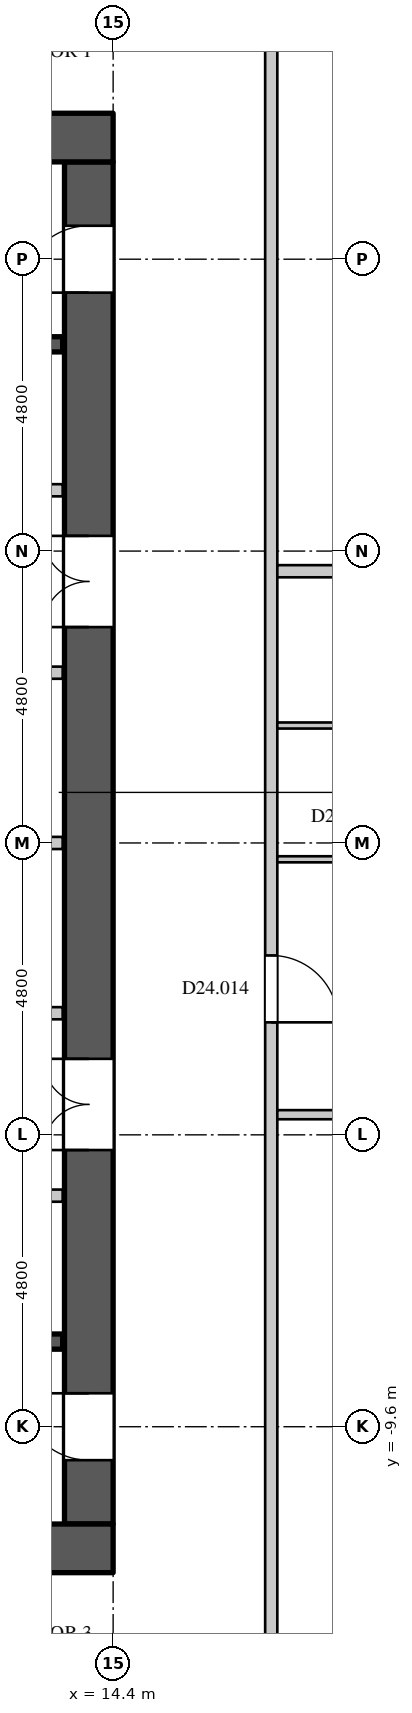
"""IFC4 building model, lengths in metres.
Left out: names, types, materials, properties, quantities, classifications, styles, units other than length and angle.
Written with IfcOpenShell. Run it as: python <this file> out.ifc"""

import sys

from ifc_helpers import new_model, si_unit, direction, frame, frame_2d, origin, place, context, subcontext, project, spatial, rectangle, extrude, element, fill, save


model = new_model("IFC4")
c1 = context("Model", 3, precision=1e-05, world=origin(), true_north=direction((0.0, 1.0)))
c2 = subcontext(c1, "Body", "Model", "MODEL_VIEW")
j1 = project(units=[si_unit("LENGTHUNIT", "METRE"), si_unit("PLANEANGLEUNIT", "RADIAN")], contexts=[c1])
p1 = place(None, origin())
s1 = spatial("IfcSite", under=j1, at=p1, CompositionType="ELEMENT")
p2 = place(p1, origin())
s2 = spatial("IfcBuilding", under=s1, at=p2, CompositionType="ELEMENT")
p3 = place(p2, frame((0.0, 0.0, 106.5)))
s3 = spatial("IfcBuildingStorey", under=s2, at=p3, CompositionType="ELEMENT", Elevation=106.5)
for number, where, z_axis, x_axis in (
    (1, (-14.4, 11.6, 0.0), (0.0, 0.0, 1.0), (1.0, 0.0, 0.0)),
    (2, (-14.4, -11.6, 0.0), (0.0, 0.0, 1.0), (1.0, 0.0, 0.0)),
):
    element("IfcWall", number, at=place(p3, frame(where, z_axis=z_axis, x_axis=x_axis)), inside=s3, PredefinedType="SHEAR", context=c2, shape_type="SweptSolid", body=[
        extrude(rectangle(XDim=28.8, YDim=0.8, at=frame_2d((14.4, 0.0))), origin(), (0.0, 0.0, 1.0), 4.2),
    ])
p4 = place(p3, frame((14.0, -11.2, 0.0), z_axis=(0.0, 0.0, 1.0), x_axis=(0.0, 1.0, 0.0)))
e3 = element("IfcWall", 3, at=p4, inside=s3, PredefinedType="SHEAR", context=c2, shape_type="SweptSolid", body=[
    extrude(rectangle(XDim=22.4, YDim=0.8, at=frame_2d((11.2, 0.0))), origin(), (0.0, 0.0, 1.0), 4.2),
])
p5 = place(p4, frame((20.25, 0.0, 0.0)))
e4 = element("IfcOpeningElement", 4, at=p5, cuts=e3, PredefinedType="OPENING", context=c2, shape_type="SweptSolid", body=[
    extrude(rectangle(XDim=1.1, YDim=2.2, at=frame_2d((0.55, 1.1))), frame((0.0, 0.41, 0.0), z_axis=(0.0, -1.0, 0.0), x_axis=(1.0, 0.0, 0.0)), (0.0, 0.0, 1.0), 0.82),
])
p6 = place(p4, frame((1.05, 0.0, 0.0)))
e5 = element("IfcOpeningElement", 5, at=p6, cuts=e3, PredefinedType="OPENING", context=c2, shape_type="SweptSolid", body=[
    extrude(rectangle(XDim=1.1, YDim=2.2, at=frame_2d((0.55, 1.1))), frame((0.0, 0.41, 0.0), z_axis=(0.0, -1.0, 0.0), x_axis=(1.0, 0.0, 0.0)), (0.0, 0.0, 1.0), 0.82),
])
p7 = place(p4, frame((14.75, 0.0, 0.0)))
e6 = element("IfcOpeningElement", 6, at=p7, cuts=e3, PredefinedType="OPENING", context=c2, shape_type="SweptSolid", body=[
    extrude(rectangle(XDim=1.5, YDim=2.4, at=frame_2d((0.75, 1.2))), frame((0.0, 0.41, 0.0), z_axis=(0.0, -1.0, 0.0), x_axis=(1.0, 0.0, 0.0)), (0.0, 0.0, 1.0), 0.82),
])
p8 = place(p4, frame((6.15, 0.0, 0.0)))
e7 = element("IfcOpeningElement", 7, at=p8, cuts=e3, PredefinedType="OPENING", context=c2, shape_type="SweptSolid", body=[
    extrude(rectangle(XDim=1.5, YDim=2.4, at=frame_2d((0.75, 1.2))), frame((0.0, 0.41, 0.0), z_axis=(0.0, -1.0, 0.0), x_axis=(1.0, 0.0, 0.0)), (0.0, 0.0, 1.0), 0.82),
])
p9 = place(p3, frame((9.02, 5.8, 0.0), z_axis=(0.0, 0.0, 1.0), x_axis=(1.0, 0.0, 0.0)))
e8 = element("IfcWall", 8, at=p9, inside=s3, PredefinedType="PARTITIONING", context=c2, shape_type="SweptSolid", body=[
    extrude(rectangle(XDim=4.55, YDim=0.2, at=frame_2d((2.275, 0.0))), origin(), (0.0, 0.0, 1.0), 3.95),
])
p10 = place(p9, frame((1.8, 0.0, 0.0)))
e9 = element("IfcOpeningElement", 9, at=p10, cuts=e8, PredefinedType="OPENING", context=c2, shape_type="SweptSolid", body=[
    extrude(rectangle(XDim=0.9, YDim=2.2, at=frame_2d((0.45, 1.1))), frame((0.0, 0.11, 0.0), z_axis=(0.0, -1.0, 0.0), x_axis=(1.0, 0.0, 0.0)), (0.0, 0.0, 1.0), 0.22),
])
p11 = place(p3, frame((17.0, -14.5, 0.0), z_axis=(0.0, 0.0, 1.0), x_axis=(0.0, 1.0, 0.0)))
e10 = element("IfcWall", 10, at=p11, inside=s3, PredefinedType="PARTITIONING", context=c2, shape_type="SweptSolid", body=[
    extrude(rectangle(XDim=29.0, YDim=0.2, at=frame_2d((14.5, 0.0))), origin(), (0.0, 0.0, 1.0), 3.95),
])
p12 = place(p11, frame((11.55, 0.0, 0.0)))
e11 = element("IfcOpeningElement", 11, at=p12, cuts=e10, PredefinedType="OPENING", context=c2, shape_type="SweptSolid", body=[
    extrude(rectangle(XDim=1.1, YDim=2.4, at=frame_2d((0.55, 1.2))), frame((0.0, 0.11, 0.0), z_axis=(0.0, -1.0, 0.0), x_axis=(1.0, 0.0, 0.0)), (0.0, 0.0, 1.0), 0.22),
])
p13 = place(p3, frame((15.24, -17.777, 0.0), z_axis=(0.0, 0.0, 1.0), x_axis=(0.707120241298, 0.707093320819, 0.0)))
e12 = element("IfcWall", 12, at=p13, inside=s3, PredefinedType="PARTITIONING", context=c2, shape_type="SweptSolid", body=[
    extrude(rectangle(XDim=9.069, YDim=0.15, at=frame_2d((4.534, 0.0))), origin(), (0.0, 0.0, 1.0), 3.95),
])
p14 = place(p13, frame((5.1, 0.0, 0.0)))
e13 = element("IfcOpeningElement", 13, at=p14, cuts=e12, PredefinedType="OPENING", context=c2, shape_type="SweptSolid", body=[
    extrude(rectangle(XDim=0.95, YDim=2.2, at=frame_2d((0.475, 1.1))), frame((0.0, 0.085, 0.0), z_axis=(0.0, -1.0, 0.0), x_axis=(1.0, 0.0, 0.0)), (0.0, 0.0, 1.0), 0.17),
])
p15 = place(p13, frame((0.4, 0.0, 0.0)))
e14 = element("IfcOpeningElement", 14, at=p15, cuts=e12, PredefinedType="OPENING", context=c2, shape_type="SweptSolid", body=[
    extrude(rectangle(XDim=0.95, YDim=2.2, at=frame_2d((0.475, 1.1))), frame((0.0, 0.085, 0.0), z_axis=(0.0, -1.0, 0.0), x_axis=(1.0, 0.0, 0.0)), (0.0, 0.0, 1.0), 0.17),
])
p16 = place(p13, frame((7.9, 0.0, 0.0)))
e15 = element("IfcOpeningElement", 15, at=p16, cuts=e12, PredefinedType="OPENING", context=c2, shape_type="SweptSolid", body=[
    extrude(rectangle(XDim=0.95, YDim=2.2, at=frame_2d((0.475, 1.1))), frame((0.0, 0.085, 0.0), z_axis=(0.0, -1.0, 0.0), x_axis=(1.0, 0.0, 0.0)), (0.0, 0.0, 1.0), 0.17),
])
p17 = place(p3, frame((16.562, 16.456, 0.0), z_axis=(0.0, 0.0, 1.0), x_axis=(0.707123735134, -0.707089826832, 0.0)))
e16 = element("IfcWall", 16, at=p17, inside=s3, PredefinedType="PARTITIONING", context=c2, shape_type="SweptSolid", body=[
    extrude(rectangle(XDim=7.2, YDim=0.15, at=frame_2d((3.6, 0.0))), origin(), (0.0, 0.0, 1.0), 3.95),
])
p18 = place(p17, frame((3.25, 0.0, 0.0)))
e17 = element("IfcOpeningElement", 17, at=p18, cuts=e16, PredefinedType="OPENING", context=c2, shape_type="SweptSolid", body=[
    extrude(rectangle(XDim=0.95, YDim=2.2, at=frame_2d((0.475, 1.1))), frame((0.0, 0.085, 0.0), z_axis=(0.0, -1.0, 0.0), x_axis=(1.0, 0.0, 0.0)), (0.0, 0.0, 1.0), 0.17),
])
p19 = place(p3, frame((17.1, -4.469, 0.0), z_axis=(0.0, 0.0, 1.0), x_axis=(1.0, 0.0, 0.0)))
e18 = element("IfcWall", 18, at=p19, inside=s3, PredefinedType="PARTITIONING", context=c2, shape_type="SweptSolid", body=[
    extrude(rectangle(XDim=8.55, YDim=0.15, at=frame_2d((4.275, 0.0))), origin(), (0.0, 0.0, 1.0), 3.3),
])
p20 = place(p19, frame((1.85, 0.0, 0.0)))
e19 = element("IfcOpeningElement", 19, at=p20, cuts=e18, PredefinedType="OPENING", context=c2, shape_type="SweptSolid", body=[
    extrude(rectangle(XDim=0.95, YDim=2.2, at=frame_2d((0.475, 1.1))), frame((0.0, 0.085, 0.0), z_axis=(0.0, -1.0, 0.0), x_axis=(1.0, 0.0, 0.0)), (0.0, 0.0, 1.0), 0.17),
])
p21 = place(p3, frame((17.1, 4.469, 0.0), z_axis=(0.0, 0.0, 1.0), x_axis=(1.0, 0.0, 0.0)))
e20 = element("IfcWall", 20, at=p21, inside=s3, PredefinedType="PARTITIONING", context=c2, shape_type="SweptSolid", body=[
    extrude(rectangle(XDim=8.55, YDim=0.2, at=frame_2d((4.275, 0.0))), origin(), (0.0, 0.0, 1.0), 3.3),
])
p22 = place(p3, frame((5.42, -5.8, 0.0), z_axis=(0.0, 0.0, 1.0), x_axis=(1.0, 0.0, 0.0)))
e21 = element("IfcWall", 21, at=p22, inside=s3, PredefinedType="PARTITIONING", context=c2, shape_type="SweptSolid", body=[
    extrude(rectangle(XDim=8.15, YDim=0.2, at=frame_2d((4.075, 0.0))), origin(), (0.0, 0.0, 1.0), 3.95),
])
p23 = place(p22, frame((3.65, 0.0, 0.0)))
e22 = element("IfcOpeningElement", 22, at=p23, cuts=e21, PredefinedType="OPENING", context=c2, shape_type="SweptSolid", body=[
    extrude(rectangle(XDim=0.9, YDim=2.2, at=frame_2d((0.45, 1.1))), frame((0.0, 0.11, 0.0), z_axis=(0.0, -1.0, 0.0), x_axis=(1.0, 0.0, 0.0)), (0.0, 0.0, 1.0), 0.22),
])
p24 = place(p3, frame((10.38, -2.8, 0.0), z_axis=(0.0, 0.0, 1.0), x_axis=(1.0, 0.0, 0.0)))
e23 = element("IfcWall", 23, at=p24, inside=s3, PredefinedType="PARTITIONING", context=c2, shape_type="SweptSolid", body=[
    extrude(rectangle(XDim=3.19, YDim=0.2, at=frame_2d((1.595, 0.0))), origin(), (0.0, 0.0, 1.0), 3.95),
])
p25 = place(p24, frame((1.1, 0.0, 0.0)))
e24 = element("IfcOpeningElement", 24, at=p25, cuts=e23, PredefinedType="OPENING", context=c2, shape_type="SweptSolid", body=[
    extrude(rectangle(XDim=0.9, YDim=2.2, at=frame_2d((0.45, 1.1))), frame((0.0, 0.11, 0.0), z_axis=(0.0, -1.0, 0.0), x_axis=(1.0, 0.0, 0.0)), (0.0, 0.0, 1.0), 0.22),
])
p26 = place(p3, frame((10.4, 2.8, 0.0), z_axis=(0.0, 0.0, 1.0), x_axis=(1.0, 0.0, 0.0)))
e25 = element("IfcWall", 25, at=p26, inside=s3, PredefinedType="PARTITIONING", context=c2, shape_type="SweptSolid", body=[
    extrude(rectangle(XDim=3.17, YDim=0.2, at=frame_2d((1.585, 0.0))), origin(), (0.0, 0.0, 1.0), 3.95),
])
p27 = place(p26, frame((1.25, 0.0, 0.0)))
e26 = element("IfcOpeningElement", 26, at=p27, cuts=e25, PredefinedType="OPENING", context=c2, shape_type="SweptSolid", body=[
    extrude(rectangle(XDim=0.6, YDim=2.0, at=frame_2d((0.3, 1.0))), frame((0.0, 0.11, 0.0), z_axis=(0.0, -1.0, 0.0), x_axis=(1.0, 0.0, 0.0)), (0.0, 0.0, 1.0), 0.22),
])
p28 = place(p3, frame((10.4, 0.0, 0.0), z_axis=(0.0, 0.0, 1.0), x_axis=(1.0, 0.0, 0.0)))
e27 = element("IfcWall", 27, at=p28, inside=s3, PredefinedType="PARTITIONING", context=c2, shape_type="SweptSolid", body=[
    extrude(rectangle(XDim=3.17, YDim=0.2, at=frame_2d((1.585, 0.0))), origin(), (0.0, 0.0, 1.0), 3.95),
])
p29 = place(p3, frame((5.525, -8.2, 0.0), z_axis=(0.0, 0.0, 1.0), x_axis=(1.0, 0.0, 0.0)))
e28 = element("IfcWall", 28, at=p29, inside=s3, PredefinedType="SHEAR", context=c2, shape_type="SweptSolid", body=[
    extrude(rectangle(XDim=8.045, YDim=0.25, at=frame_2d((4.022, 0.0))), origin(), (0.0, 0.0, 1.0), 3.95),
])
p30 = place(p3, frame((5.275, 8.2, 0.0), z_axis=(0.0, 0.0, 1.0), x_axis=(1.0, 0.0, 0.0)))
e29 = element("IfcWall", 29, at=p30, inside=s3, PredefinedType="SHEAR", context=c2, shape_type="SweptSolid", body=[
    extrude(rectangle(XDim=8.295, YDim=0.25, at=frame_2d((4.147, 0.0))), origin(), (0.0, 0.0, 1.0), 3.95),
])
p31 = place(p3, frame((17.1, -0.269, 0.0), z_axis=(0.0, 0.0, 1.0), x_axis=(1.0, 0.0, 0.0)))
e30 = element("IfcWall", 30, at=p31, inside=s3, PredefinedType="PARTITIONING", context=c2, shape_type="SweptSolid", body=[
    extrude(rectangle(XDim=3.65, YDim=0.1, at=frame_2d((1.825, 0.0))), origin(), (0.0, 0.0, 1.0), 3.95),
])
p32 = place(p31, frame((1.85, 0.0, 0.0)))
e31 = element("IfcOpeningElement", 31, at=p32, cuts=e30, PredefinedType="OPENING", context=c2, shape_type="SweptSolid", body=[
    extrude(rectangle(XDim=0.9, YDim=2.2, at=frame_2d((0.45, 1.1))), frame((0.0, 0.06, 0.0), z_axis=(0.0, -1.0, 0.0), x_axis=(1.0, 0.0, 0.0)), (0.0, 0.0, 1.0), 0.12),
])
p33 = place(p3, frame((17.1, 1.931, 0.0), z_axis=(0.0, 0.0, 1.0), x_axis=(1.0, 0.0, 0.0)))
e32 = element("IfcWall", 32, at=p33, inside=s3, PredefinedType="PARTITIONING", context=c2, shape_type="SweptSolid", body=[
    extrude(rectangle(XDim=3.65, YDim=0.1, at=frame_2d((1.825, 0.0))), origin(), (0.0, 0.0, 1.0), 3.95),
])
p34 = place(p5, origin())
e33 = element("IfcDoor", 33, at=p34, inside=s3, OperationType="SINGLE_SWING_LEFT", PredefinedType="DOOR", context=c2, shape_type="SweptSolid", body=[
    extrude(rectangle(XDim=1.1, YDim=2.2, at=frame_2d((0.55, 1.1))), frame((0.0, 0.395, 0.0), z_axis=(0.0, -1.0, 0.0), x_axis=(1.0, 0.0, 0.0)), (0.0, 0.0, 1.0), 0.05),
])
fill(e4, e33)
p35 = place(p6, origin())
e34 = element("IfcDoor", 34, at=p35, inside=s3, OperationType="SINGLE_SWING_RIGHT", PredefinedType="DOOR", context=c2, shape_type="SweptSolid", body=[
    extrude(rectangle(XDim=1.1, YDim=2.2, at=frame_2d((0.55, 1.1))), frame((0.0, 0.395, 0.0), z_axis=(0.0, -1.0, 0.0), x_axis=(1.0, 0.0, 0.0)), (0.0, 0.0, 1.0), 0.05),
])
fill(e5, e34)
p36 = place(p7, origin())
e35 = element("IfcDoor", 35, at=p36, inside=s3, OperationType="DOUBLE_DOOR_SINGLE_SWING", PredefinedType="DOOR", context=c2, shape_type="SweptSolid", body=[
    extrude(rectangle(XDim=1.5, YDim=2.4, at=frame_2d((0.75, 1.2))), frame((0.0, 0.395, 0.0), z_axis=(0.0, -1.0, 0.0), x_axis=(1.0, 0.0, 0.0)), (0.0, 0.0, 1.0), 0.05),
])
fill(e6, e35)
p37 = place(p8, origin())
e36 = element("IfcDoor", 36, at=p37, inside=s3, OperationType="DOUBLE_DOOR_SINGLE_SWING", PredefinedType="DOOR", context=c2, shape_type="SweptSolid", body=[
    extrude(rectangle(XDim=1.5, YDim=2.4, at=frame_2d((0.75, 1.2))), frame((0.0, 0.395, 0.0), z_axis=(0.0, -1.0, 0.0), x_axis=(1.0, 0.0, 0.0)), (0.0, 0.0, 1.0), 0.05),
])
fill(e7, e36)
p38 = place(p12, origin())
e37 = element("IfcDoor", 37, at=p38, inside=s3, OperationType="SINGLE_SWING_RIGHT", PredefinedType="DOOR", context=c2, shape_type="SweptSolid", body=[
    extrude(rectangle(XDim=1.1, YDim=2.4, at=frame_2d((0.55, 1.2))), frame((0.0, 0.025, 0.0), z_axis=(0.0, -1.0, 0.0), x_axis=(1.0, 0.0, 0.0)), (0.0, 0.0, 1.0), 0.05),
])
fill(e11, e37)
save(model, sys.argv[1])
